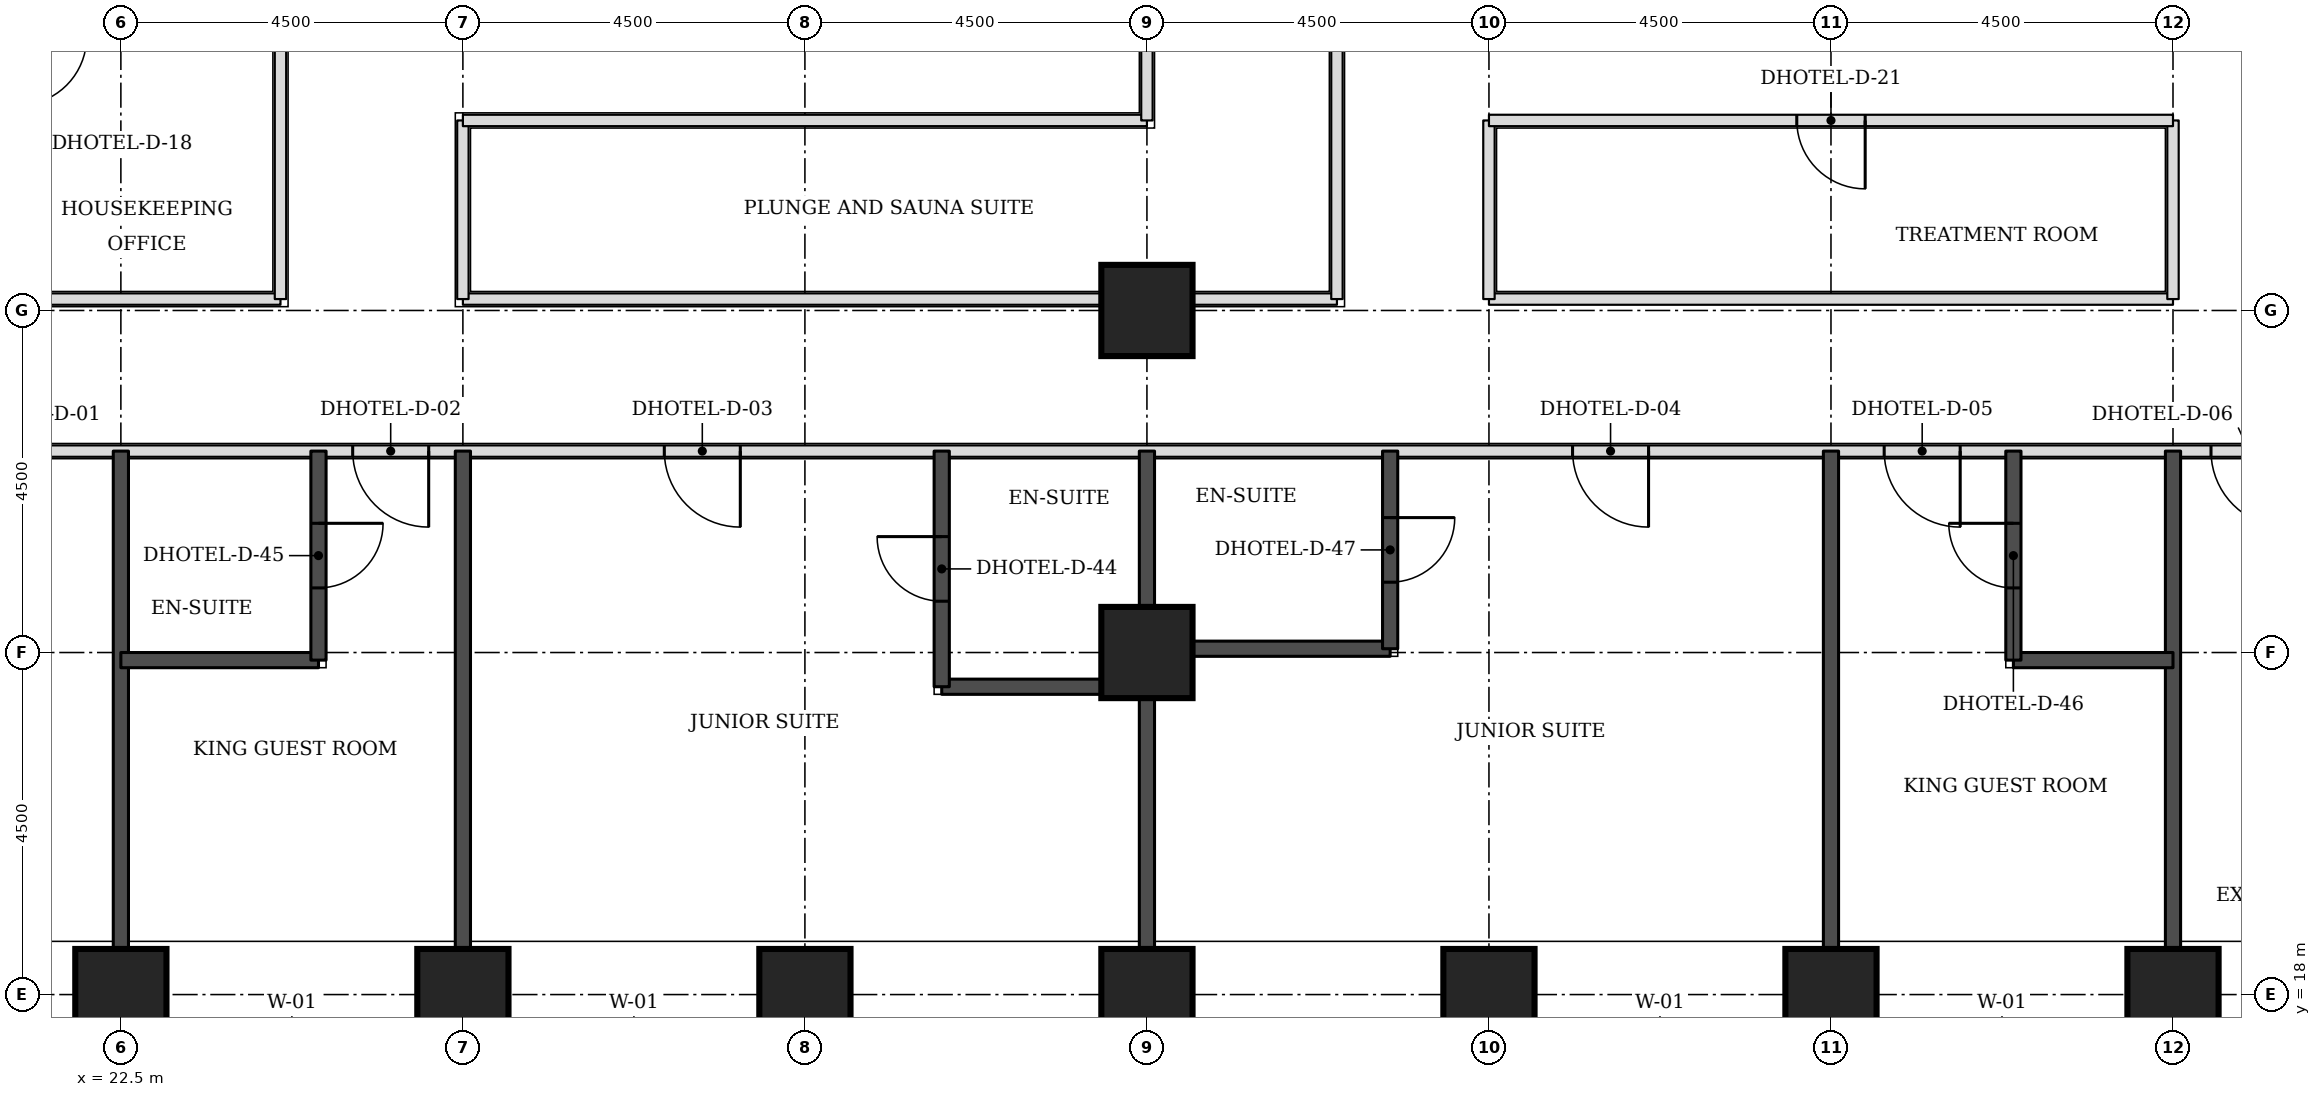
"""IFC4 building model, lengths in metres.
Left out: names, types, materials, properties, quantities, classifications, styles, units other than length and angle.
Written with IfcOpenShell. Run it as: python <this file> out.ifc"""

import sys

from ifc_helpers import new_model, si_unit, direction, frame, frame_2d, origin, origin_2d, place, context, subcontext, project, spatial, rectangle, extrude, element, fill, save


model = new_model("IFC4")
c1 = context("Model", 3, precision=1e-05, world=origin(), true_north=direction((0.0, 1.0)))
c2 = subcontext(c1, "Body", "Model", "MODEL_VIEW")
j1 = project(units=[si_unit("LENGTHUNIT", "METRE"), si_unit("PLANEANGLEUNIT", "RADIAN")], contexts=[c1])
p1 = place(None, origin())
s1 = spatial("IfcSite", under=j1, at=p1, CompositionType="ELEMENT")
p2 = place(p1, origin())
s2 = spatial("IfcBuilding", under=s1, at=p2, CompositionType="ELEMENT")
p3 = place(p2, frame((0.0, 0.0, 36.3)))
s3 = spatial("IfcBuildingStorey", under=s2, at=p3, CompositionType="ELEMENT", Elevation=36.3)
for number, where, z_axis, x_axis in (
    (1, (22.5, 18.0, 0.0), (0.0, 0.0, 1.0), (1.0, 0.0, 0.0)),
    (2, (27.0, 18.0, 0.0), (0.0, 0.0, 1.0), (1.0, 0.0, 0.0)),
    (3, (31.5, 18.0, 0.0), (0.0, 0.0, 1.0), (1.0, 0.0, 0.0)),
    (4, (36.0, 18.0, 0.0), (0.0, 0.0, 1.0), (1.0, 0.0, 0.0)),
    (5, (40.5, 18.0, 0.0), (0.0, 0.0, 1.0), (1.0, 0.0, 0.0)),
    (6, (45.0, 18.0, 0.0), (0.0, 0.0, 1.0), (1.0, 0.0, 0.0)),
    (7, (49.5, 18.0, 0.0), (0.0, 0.0, 1.0), (1.0, 0.0, 0.0)),
    (8, (36.0, 22.5, 0.0), (0.0, 0.0, 1.0), (1.0, 0.0, 0.0)),
    (9, (36.0, 27.0, 0.0), (0.0, 0.0, 1.0), (1.0, 0.0, 0.0)),
):
    element("IfcColumn", number, at=place(p3, frame(where, z_axis=z_axis, x_axis=x_axis)), inside=s3, PredefinedType="COLUMN", context=c2, shape_type="SweptSolid", body=[
        extrude(rectangle(XDim=1.2, YDim=1.2, at=origin_2d()), origin(), (0.0, 0.0, 1.0), 3.3),
    ])
p4 = place(p3, frame((19.15, 25.15, 0.0), z_axis=(0.0, 0.0, 1.0), x_axis=(1.0, 0.0, 0.0)))
e10 = element("IfcWall", 10, at=p4, inside=s3, PredefinedType="PARTITIONING", context=c2, shape_type="SweptSolid", body=[
    extrude(rectangle(XDim=32.35, YDim=0.15, at=frame_2d((16.175, 0.0))), origin(), (0.0, 0.0, 1.0), 3.08),
])
p5 = place(p4, frame((6.4, 0.0, 0.0)))
e11 = element("IfcOpeningElement", 11, at=p5, cuts=e10, PredefinedType="OPENING", context=c2, shape_type="SweptSolid", body=[
    extrude(rectangle(XDim=1.0, YDim=2.1, at=frame_2d((0.5, 1.05))), frame((0.0, 0.085, 0.0), z_axis=(0.0, -1.0, 0.0), x_axis=(1.0, 0.0, 0.0)), (0.0, 0.0, 1.0), 0.17),
])
p6 = place(p4, frame((10.5, 0.0, 0.0)))
e12 = element("IfcOpeningElement", 12, at=p6, cuts=e10, PredefinedType="OPENING", context=c2, shape_type="SweptSolid", body=[
    extrude(rectangle(XDim=1.0, YDim=2.1, at=frame_2d((0.5, 1.05))), frame((0.0, 0.085, 0.0), z_axis=(0.0, -1.0, 0.0), x_axis=(1.0, 0.0, 0.0)), (0.0, 0.0, 1.0), 0.17),
])
p7 = place(p4, frame((22.45, 0.0, 0.0)))
e13 = element("IfcOpeningElement", 13, at=p7, cuts=e10, PredefinedType="OPENING", context=c2, shape_type="SweptSolid", body=[
    extrude(rectangle(XDim=1.0, YDim=2.1, at=frame_2d((0.5, 1.05))), frame((0.0, 0.085, 0.0), z_axis=(0.0, -1.0, 0.0), x_axis=(1.0, 0.0, 0.0)), (0.0, 0.0, 1.0), 0.17),
])
p8 = place(p4, frame((26.55, 0.0, 0.0)))
e14 = element("IfcOpeningElement", 14, at=p8, cuts=e10, PredefinedType="OPENING", context=c2, shape_type="SweptSolid", body=[
    extrude(rectangle(XDim=1.0, YDim=2.1, at=frame_2d((0.5, 1.05))), frame((0.0, 0.085, 0.0), z_axis=(0.0, -1.0, 0.0), x_axis=(1.0, 0.0, 0.0)), (0.0, 0.0, 1.0), 0.17),
])
p9 = place(p4, frame((1.175, 0.0, 0.0)))
e15 = element("IfcOpeningElement", 15, at=p9, cuts=e10, PredefinedType="OPENING", context=c2, shape_type="SweptSolid", body=[
    extrude(rectangle(XDim=1.0, YDim=2.1, at=frame_2d((0.5, 1.05))), frame((0.0, 0.085, 0.0), z_axis=(0.0, -1.0, 0.0), x_axis=(1.0, 0.0, 0.0)), (0.0, 0.0, 1.0), 0.17),
])
p10 = place(p4, frame((30.85, 0.0, 0.0)))
e16 = element("IfcOpeningElement", 16, at=p10, cuts=e10, PredefinedType="OPENING", context=c2, shape_type="SweptSolid", body=[
    extrude(rectangle(XDim=1.0, YDim=2.1, at=frame_2d((0.5, 1.05))), frame((0.0, 0.085, 0.0), z_axis=(0.0, -1.0, 0.0), x_axis=(1.0, 0.0, 0.0)), (0.0, 0.0, 1.0), 0.17),
])
p11 = place(p3, frame((21.15, 27.15, 0.0), z_axis=(0.0, 0.0, 1.0), x_axis=(1.0, 0.0, 0.0)))
e17 = element("IfcWall", 17, at=p11, inside=s3, PredefinedType="PARTITIONING", context=c2, shape_type="SweptSolid", body=[
    extrude(rectangle(XDim=3.45, YDim=0.15, at=frame_2d((1.725, 0.0))), origin(), (0.0, 0.0, 1.0), 3.08),
])
p12 = place(p3, frame((24.6, 27.15, 0.0), z_axis=(0.0, 0.0, 1.0), x_axis=(0.0, 1.0, 0.0)))
e18 = element("IfcWall", 18, at=p12, inside=s3, PredefinedType="PARTITIONING", context=c2, shape_type="SweptSolid", body=[
    extrude(rectangle(XDim=13.35, YDim=0.15, at=frame_2d((6.675, 0.0))), origin(), (0.0, 0.0, 1.0), 3.08),
])
p13 = place(p3, frame((27.0, 27.15, 0.0), z_axis=(0.0, 0.0, 1.0), x_axis=(1.0, 0.0, 0.0)))
e19 = element("IfcWall", 19, at=p13, inside=s3, PredefinedType="PARTITIONING", context=c2, shape_type="SweptSolid", body=[
    extrude(rectangle(XDim=11.5, YDim=0.15, at=frame_2d((5.75, 0.0))), origin(), (0.0, 0.0, 1.0), 3.08),
])
p14 = place(p3, frame((27.0, 27.15, 0.0), z_axis=(0.0, 0.0, 1.0), x_axis=(0.0, 1.0, 0.0)))
e20 = element("IfcWall", 20, at=p14, inside=s3, PredefinedType="PARTITIONING", context=c2, shape_type="SweptSolid", body=[
    extrude(rectangle(XDim=2.35, YDim=0.15, at=frame_2d((1.175, 0.0))), origin(), (0.0, 0.0, 1.0), 3.08),
])
p15 = place(p3, frame((38.5, 27.15, 0.0), z_axis=(0.0, 0.0, 1.0), x_axis=(0.0, 1.0, 0.0)))
e21 = element("IfcWall", 21, at=p15, inside=s3, PredefinedType="PARTITIONING", context=c2, shape_type="SweptSolid", body=[
    extrude(rectangle(XDim=13.35, YDim=0.15, at=frame_2d((6.675, 0.0))), origin(), (0.0, 0.0, 1.0), 3.08),
])
p16 = place(p15, frame((6.225, 0.0, 0.0)))
e22 = element("IfcOpeningElement", 22, at=p16, cuts=e21, PredefinedType="OPENING", context=c2, shape_type="SweptSolid", body=[
    extrude(rectangle(XDim=0.9, YDim=2.1, at=frame_2d((0.45, 1.05))), frame((0.0, 0.085, 0.0), z_axis=(0.0, -1.0, 0.0), x_axis=(1.0, 0.0, 0.0)), (0.0, 0.0, 1.0), 0.17),
])
p17 = place(p3, frame((40.5, 27.15, 0.0), z_axis=(0.0, 0.0, 1.0), x_axis=(1.0, 0.0, 0.0)))
e23 = element("IfcWall", 23, at=p17, inside=s3, PredefinedType="PARTITIONING", context=c2, shape_type="SweptSolid", body=[
    extrude(rectangle(XDim=9.0, YDim=0.15, at=frame_2d((4.5, 0.0))), origin(), (0.0, 0.0, 1.0), 3.08),
])
for number, where, z_axis, x_axis in (
    (24, (40.5, 27.15, 0.0), (0.0, 0.0, 1.0), (0.0, 1.0, 0.0)),
    (25, (49.5, 27.15, 0.0), (0.0, 0.0, 1.0), (0.0, 1.0, 0.0)),
):
    element("IfcWall", number, at=place(p3, frame(where, z_axis=z_axis, x_axis=x_axis)), inside=s3, PredefinedType="PARTITIONING", context=c2, shape_type="SweptSolid", body=[
        extrude(rectangle(XDim=2.35, YDim=0.15, at=frame_2d((1.175, 0.0))), origin(), (0.0, 0.0, 1.0), 3.08),
    ])
p18 = place(p3, frame((27.0, 29.5, 0.0), z_axis=(0.0, 0.0, 1.0), x_axis=(1.0, 0.0, 0.0)))
e26 = element("IfcWall", 26, at=p18, inside=s3, PredefinedType="PARTITIONING", context=c2, shape_type="SweptSolid", body=[
    extrude(rectangle(XDim=9.0, YDim=0.15, at=frame_2d((4.5, 0.0))), origin(), (0.0, 0.0, 1.0), 3.08),
])
p19 = place(p3, frame((36.0, 29.5, 0.0), z_axis=(0.0, 0.0, 1.0), x_axis=(0.0, 1.0, 0.0)))
e27 = element("IfcWall", 27, at=p19, inside=s3, PredefinedType="PARTITIONING", context=c2, shape_type="SweptSolid", body=[
    extrude(rectangle(XDim=1.95, YDim=0.15, at=frame_2d((0.975, 0.0))), origin(), (0.0, 0.0, 1.0), 2.33),
])
p20 = place(p3, frame((40.5, 29.5, 0.0), z_axis=(0.0, 0.0, 1.0), x_axis=(1.0, 0.0, 0.0)))
e28 = element("IfcWall", 28, at=p20, inside=s3, PredefinedType="PARTITIONING", context=c2, shape_type="SweptSolid", body=[
    extrude(rectangle(XDim=9.0, YDim=0.15, at=frame_2d((4.5, 0.0))), origin(), (0.0, 0.0, 1.0), 3.08),
])
p21 = place(p20, frame((4.05, 0.0, 0.0)))
e29 = element("IfcOpeningElement", 29, at=p21, cuts=e28, PredefinedType="OPENING", context=c2, shape_type="SweptSolid", body=[
    extrude(rectangle(XDim=0.9, YDim=2.1, at=frame_2d((0.45, 1.05))), frame((0.0, 0.085, 0.0), z_axis=(0.0, -1.0, 0.0), x_axis=(1.0, 0.0, 0.0)), (0.0, 0.0, 1.0), 0.17),
])
for number, where, z_axis, x_axis in (
    (30, (22.5, 18.6, 0.0), (0.0, 0.0, 1.0), (0.0, 1.0, 0.0)),
    (31, (27.0, 18.6, 0.0), (0.0, 0.0, 1.0), (0.0, 1.0, 0.0)),
    (32, (36.0, 18.6, 0.0), (0.0, 0.0, 1.0), (0.0, 1.0, 0.0)),
    (33, (45.0, 18.6, 0.0), (0.0, 0.0, 1.0), (0.0, 1.0, 0.0)),
    (34, (49.5, 18.6, 0.0), (0.0, 0.0, 1.0), (0.0, 1.0, 0.0)),
):
    element("IfcWall", number, at=place(p3, frame(where, z_axis=z_axis, x_axis=x_axis)), inside=s3, PredefinedType="SOLIDWALL", context=c2, shape_type="SweptSolid", body=[
        extrude(rectangle(XDim=6.55, YDim=0.2, at=frame_2d((3.275, 0.0))), origin(), (0.0, 0.0, 1.0), 3.08),
    ])
p22 = place(p3, frame((33.3, 22.05, 0.0), z_axis=(0.0, 0.0, 1.0), x_axis=(1.0, 0.0, 0.0)))
e35 = element("IfcWall", 35, at=p22, inside=s3, PredefinedType="SOLIDWALL", context=c2, shape_type="SweptSolid", body=[
    extrude(rectangle(XDim=2.7, YDim=0.2, at=frame_2d((1.35, 0.0))), origin(), (0.0, 0.0, 1.0), 3.08),
])
p23 = place(p3, frame((33.3, 22.05, 0.0), z_axis=(0.0, 0.0, 1.0), x_axis=(0.0, 1.0, 0.0)))
e36 = element("IfcWall", 36, at=p23, inside=s3, PredefinedType="SOLIDWALL", context=c2, shape_type="SweptSolid", body=[
    extrude(rectangle(XDim=3.1, YDim=0.2, at=frame_2d((1.55, 0.0))), origin(), (0.0, 0.0, 1.0), 3.08),
])
p24 = place(p23, frame((1.125, 0.0, 0.0)))
e37 = element("IfcOpeningElement", 37, at=p24, cuts=e36, PredefinedType="OPENING", context=c2, shape_type="SweptSolid", body=[
    extrude(rectangle(XDim=0.85, YDim=2.1, at=frame_2d((0.425, 1.05))), frame((0.0, 0.11, 0.0), z_axis=(0.0, -1.0, 0.0), x_axis=(1.0, 0.0, 0.0)), (0.0, 0.0, 1.0), 0.22),
])
p25 = place(p3, frame((22.5, 22.4, 0.0), z_axis=(0.0, 0.0, 1.0), x_axis=(1.0, 0.0, 0.0)))
e38 = element("IfcWall", 38, at=p25, inside=s3, PredefinedType="SOLIDWALL", context=c2, shape_type="SweptSolid", body=[
    extrude(rectangle(XDim=2.6, YDim=0.2, at=frame_2d((1.3, 0.0))), origin(), (0.0, 0.0, 1.0), 3.08),
])
p26 = place(p3, frame((25.1, 22.4, 0.0), z_axis=(0.0, 0.0, 1.0), x_axis=(0.0, 1.0, 0.0)))
e39 = element("IfcWall", 39, at=p26, inside=s3, PredefinedType="SOLIDWALL", context=c2, shape_type="SweptSolid", body=[
    extrude(rectangle(XDim=2.75, YDim=0.2, at=frame_2d((1.375, 0.0))), origin(), (0.0, 0.0, 1.0), 3.08),
])
p27 = place(p26, frame((0.95, 0.0, 0.0)))
e40 = element("IfcOpeningElement", 40, at=p27, cuts=e39, PredefinedType="OPENING", context=c2, shape_type="SweptSolid", body=[
    extrude(rectangle(XDim=0.85, YDim=2.1, at=frame_2d((0.425, 1.05))), frame((0.0, 0.11, 0.0), z_axis=(0.0, -1.0, 0.0), x_axis=(1.0, 0.0, 0.0)), (0.0, 0.0, 1.0), 0.22),
])
p28 = place(p3, frame((47.4, 22.4, 0.0), z_axis=(0.0, 0.0, 1.0), x_axis=(1.0, 0.0, 0.0)))
e41 = element("IfcWall", 41, at=p28, inside=s3, PredefinedType="SOLIDWALL", context=c2, shape_type="SweptSolid", body=[
    extrude(rectangle(XDim=2.1, YDim=0.2, at=frame_2d((1.05, 0.0))), origin(), (0.0, 0.0, 1.0), 3.08),
])
p29 = place(p3, frame((47.4, 22.4, 0.0), z_axis=(0.0, 0.0, 1.0), x_axis=(0.0, 1.0, 0.0)))
e42 = element("IfcWall", 42, at=p29, inside=s3, PredefinedType="SOLIDWALL", context=c2, shape_type="SweptSolid", body=[
    extrude(rectangle(XDim=2.75, YDim=0.2, at=frame_2d((1.375, 0.0))), origin(), (0.0, 0.0, 1.0), 3.08),
])
p30 = place(p29, frame((0.95, 0.0, 0.0)))
e43 = element("IfcOpeningElement", 43, at=p30, cuts=e42, PredefinedType="OPENING", context=c2, shape_type="SweptSolid", body=[
    extrude(rectangle(XDim=0.85, YDim=2.1, at=frame_2d((0.425, 1.05))), frame((0.0, 0.11, 0.0), z_axis=(0.0, -1.0, 0.0), x_axis=(1.0, 0.0, 0.0)), (0.0, 0.0, 1.0), 0.22),
])
p31 = place(p3, frame((36.0, 22.55, 0.0), z_axis=(0.0, 0.0, 1.0), x_axis=(1.0, 0.0, 0.0)))
e44 = element("IfcWall", 44, at=p31, inside=s3, PredefinedType="SOLIDWALL", context=c2, shape_type="SweptSolid", body=[
    extrude(rectangle(XDim=3.2, YDim=0.2, at=frame_2d((1.6, 0.0))), origin(), (0.0, 0.0, 1.0), 3.08),
])
p32 = place(p3, frame((39.2, 22.55, 0.0), z_axis=(0.0, 0.0, 1.0), x_axis=(0.0, 1.0, 0.0)))
e45 = element("IfcWall", 45, at=p32, inside=s3, PredefinedType="SOLIDWALL", context=c2, shape_type="SweptSolid", body=[
    extrude(rectangle(XDim=2.6, YDim=0.2, at=frame_2d((1.3, 0.0))), origin(), (0.0, 0.0, 1.0), 3.08),
])
p33 = place(p32, frame((0.875, 0.0, 0.0)))
e46 = element("IfcOpeningElement", 46, at=p33, cuts=e45, PredefinedType="OPENING", context=c2, shape_type="SweptSolid", body=[
    extrude(rectangle(XDim=0.85, YDim=2.1, at=frame_2d((0.425, 1.05))), frame((0.0, 0.11, 0.0), z_axis=(0.0, -1.0, 0.0), x_axis=(1.0, 0.0, 0.0)), (0.0, 0.0, 1.0), 0.22),
])
p34 = place(p5, frame((1.0, 0.0, 0.0), z_axis=(0.0, 0.0, 1.0), x_axis=(-1.0, 0.0, 0.0)))
e47 = element("IfcDoor", 47, at=p34, inside=s3, OperationType="SINGLE_SWING_LEFT", PredefinedType="DOOR", context=c2, shape_type="SweptSolid", body=[
    extrude(rectangle(XDim=1.0, YDim=2.1, at=frame_2d((0.5, 1.05))), frame((0.0, 0.025, 0.0), z_axis=(0.0, -1.0, 0.0), x_axis=(1.0, 0.0, 0.0)), (0.0, 0.0, 1.0), 0.05),
])
fill(e11, e47)
p35 = place(p27, frame((0.85, 0.0, 0.0), z_axis=(0.0, 0.0, 1.0), x_axis=(-1.0, 0.0, 0.0)))
e48 = element("IfcDoor", 48, at=p35, inside=s3, OperationType="SINGLE_SWING_LEFT", PredefinedType="DOOR", context=c2, shape_type="SweptSolid", body=[
    extrude(rectangle(XDim=0.85, YDim=2.1, at=frame_2d((0.425, 1.05))), frame((0.0, 0.025, 0.0), z_axis=(0.0, -1.0, 0.0), x_axis=(1.0, 0.0, 0.0)), (0.0, 0.0, 1.0), 0.05),
])
fill(e40, e48)
p36 = place(p6, frame((1.0, 0.0, 0.0), z_axis=(0.0, 0.0, 1.0), x_axis=(-1.0, 0.0, 0.0)))
e49 = element("IfcDoor", 49, at=p36, inside=s3, OperationType="SINGLE_SWING_LEFT", PredefinedType="DOOR", context=c2, shape_type="SweptSolid", body=[
    extrude(rectangle(XDim=1.0, YDim=2.1, at=frame_2d((0.5, 1.05))), frame((0.0, 0.025, 0.0), z_axis=(0.0, -1.0, 0.0), x_axis=(1.0, 0.0, 0.0)), (0.0, 0.0, 1.0), 0.05),
])
fill(e12, e49)
p37 = place(p24, origin())
e50 = element("IfcDoor", 50, at=p37, inside=s3, OperationType="SINGLE_SWING_RIGHT", PredefinedType="DOOR", context=c2, shape_type="SweptSolid", body=[
    extrude(rectangle(XDim=0.85, YDim=2.1, at=frame_2d((0.425, 1.05))), frame((0.0, 0.025, 0.0), z_axis=(0.0, -1.0, 0.0), x_axis=(1.0, 0.0, 0.0)), (0.0, 0.0, 1.0), 0.05),
])
fill(e37, e50)
p38 = place(p7, frame((1.0, 0.0, 0.0), z_axis=(0.0, 0.0, 1.0), x_axis=(-1.0, 0.0, 0.0)))
e51 = element("IfcDoor", 51, at=p38, inside=s3, OperationType="SINGLE_SWING_LEFT", PredefinedType="DOOR", context=c2, shape_type="SweptSolid", body=[
    extrude(rectangle(XDim=1.0, YDim=2.1, at=frame_2d((0.5, 1.05))), frame((0.0, 0.025, 0.0), z_axis=(0.0, -1.0, 0.0), x_axis=(1.0, 0.0, 0.0)), (0.0, 0.0, 1.0), 0.05),
])
fill(e13, e51)
p39 = place(p33, frame((0.85, 0.0, 0.0), z_axis=(0.0, 0.0, 1.0), x_axis=(-1.0, 0.0, 0.0)))
e52 = element("IfcDoor", 52, at=p39, inside=s3, OperationType="SINGLE_SWING_LEFT", PredefinedType="DOOR", context=c2, shape_type="SweptSolid", body=[
    extrude(rectangle(XDim=0.85, YDim=2.1, at=frame_2d((0.425, 1.05))), frame((0.0, 0.025, 0.0), z_axis=(0.0, -1.0, 0.0), x_axis=(1.0, 0.0, 0.0)), (0.0, 0.0, 1.0), 0.05),
])
fill(e46, e52)
p40 = place(p8, frame((1.0, 0.0, 0.0), z_axis=(0.0, 0.0, 1.0), x_axis=(-1.0, 0.0, 0.0)))
e53 = element("IfcDoor", 53, at=p40, inside=s3, OperationType="SINGLE_SWING_LEFT", PredefinedType="DOOR", context=c2, shape_type="SweptSolid", body=[
    extrude(rectangle(XDim=1.0, YDim=2.1, at=frame_2d((0.5, 1.05))), frame((0.0, 0.025, 0.0), z_axis=(0.0, -1.0, 0.0), x_axis=(1.0, 0.0, 0.0)), (0.0, 0.0, 1.0), 0.05),
])
fill(e14, e53)
p41 = place(p30, origin())
e54 = element("IfcDoor", 54, at=p41, inside=s3, OperationType="SINGLE_SWING_RIGHT", PredefinedType="DOOR", context=c2, shape_type="SweptSolid", body=[
    extrude(rectangle(XDim=0.85, YDim=2.1, at=frame_2d((0.425, 1.05))), frame((0.0, 0.025, 0.0), z_axis=(0.0, -1.0, 0.0), x_axis=(1.0, 0.0, 0.0)), (0.0, 0.0, 1.0), 0.05),
])
fill(e43, e54)
p42 = place(p10, frame((1.0, 0.0, 0.0), z_axis=(0.0, 0.0, 1.0), x_axis=(-1.0, 0.0, 0.0)))
e55 = element("IfcDoor", 55, at=p42, inside=s3, OperationType="SINGLE_SWING_LEFT", PredefinedType="DOOR", context=c2, shape_type="SweptSolid", body=[
    extrude(rectangle(XDim=1.0, YDim=2.1, at=frame_2d((0.5, 1.05))), frame((0.0, 0.025, 0.0), z_axis=(0.0, -1.0, 0.0), x_axis=(1.0, 0.0, 0.0)), (0.0, 0.0, 1.0), 0.05),
])
fill(e16, e55)
p43 = place(p21, frame((0.9, 0.0, 0.0), z_axis=(0.0, 0.0, 1.0), x_axis=(-1.0, 0.0, 0.0)))
e56 = element("IfcDoor", 56, at=p43, inside=s3, OperationType="SINGLE_SWING_LEFT", PredefinedType="DOOR", context=c2, shape_type="SweptSolid", body=[
    extrude(rectangle(XDim=0.9, YDim=2.1, at=frame_2d((0.45, 1.05))), frame((0.0, 0.025, 0.0), z_axis=(0.0, -1.0, 0.0), x_axis=(1.0, 0.0, 0.0)), (0.0, 0.0, 1.0), 0.05),
])
fill(e29, e56)
save(model, sys.argv[1])
